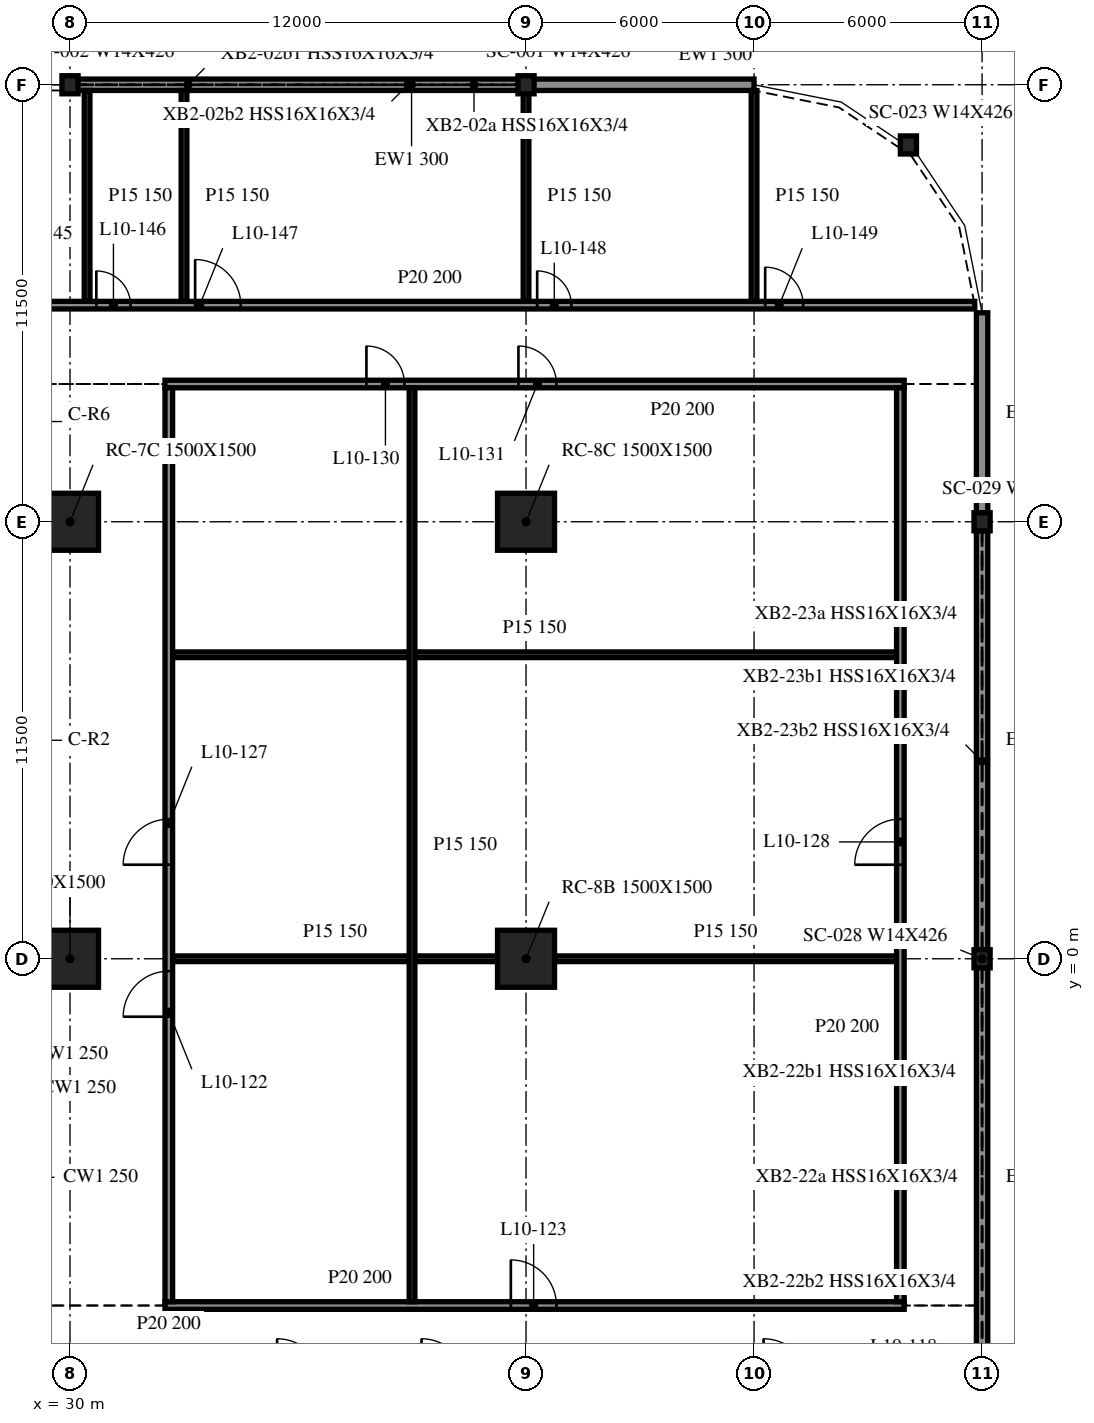
"""IFC4 building model, lengths in metres.
Left out: names, types, materials, properties, quantities, classifications, styles, units other than length and angle.
Written with IfcOpenShell. Run it as: python <this file> out.ifc"""

import sys

from ifc_helpers import new_model, si_unit, direction, frame, frame_2d, origin, origin_2d, place, context, subcontext, project, spatial, rectangle, i_section, extrude, element, fill, save


model = new_model("IFC4")
c1 = context("Model", 3, precision=1e-05, world=origin(), true_north=direction((0.0, 1.0)))
c2 = subcontext(c1, "Body", "Model", "MODEL_VIEW")
j1 = project(units=[si_unit("LENGTHUNIT", "METRE"), si_unit("PLANEANGLEUNIT", "RADIAN")], contexts=[c1])
p1 = place(None, origin())
s1 = spatial("IfcSite", under=j1, at=p1, CompositionType="ELEMENT")
p2 = place(p1, origin())
s2 = spatial("IfcBuilding", under=s1, at=p2, CompositionType="ELEMENT")
p3 = place(p2, frame((0.0, 0.0, 46.0)))
s3 = spatial("IfcBuildingStorey", under=s2, at=p3, CompositionType="ELEMENT", Elevation=46.0)
for number, where, z_axis, x_axis in (
    (1, (30.0, 0.0, -0.34), (0.0, 0.0, 1.0), (1.0, 0.0, 0.0)),
    (2, (30.0, 11.5, -0.34), (0.0, 0.0, 1.0), (1.0, 0.0, 0.0)),
    (3, (42.0, 0.0, -0.34), (0.0, 0.0, 1.0), (1.0, 0.0, 0.0)),
    (4, (42.0, 11.5, -0.34), (0.0, 0.0, 1.0), (1.0, 0.0, 0.0)),
):
    element("IfcColumn", number, at=place(p3, frame(where, z_axis=z_axis, x_axis=x_axis)), inside=s3, PredefinedType="COLUMN", context=c2, shape_type="SweptSolid", body=[
        extrude(rectangle(XDim=1.5, YDim=1.5, at=origin_2d()), origin(), (0.0, 0.0, 1.0), 4.3),
    ])
for number, where, z_axis, x_axis in (
    (5, (52.062, 21.416, -0.34), (0.0, 0.0, 1.0), (1.0, 0.0, 0.0)),
    (6, (42.0, 23.0, -0.34), (0.0, 0.0, 1.0), (1.0, 0.0, 0.0)),
    (7, (30.0, 23.0, -0.34), (0.0, 0.0, 1.0), (1.0, 0.0, 0.0)),
    (8, (54.0, 0.0, -0.34), (0.0, 0.0, 1.0), (1.0, 0.0, 0.0)),
    (9, (54.0, 11.5, -0.34), (0.0, 0.0, 1.0), (1.0, 0.0, 0.0)),
):
    element("IfcColumn", number, at=place(p3, frame(where, z_axis=z_axis, x_axis=x_axis)), inside=s3, PredefinedType="COLUMN", context=c2, shape_type="SweptSolid", body=[
        extrude(i_section(OverallWidth=0.424, OverallDepth=0.475, WebThickness=0.048, FlangeThickness=0.077, at=origin_2d()), origin(), (0.0, 0.0, 1.0), 4.3),
    ])
p4 = place(p3, frame((48.0, 23.0, 0.0), z_axis=(0.0, 0.0, 1.0), x_axis=(-1.0, 0.0, 0.0)))
e10 = element("IfcWall", 10, at=p4, inside=s3, PredefinedType="NOTDEFINED", context=c2, shape_type="SweptSolid", body=[
    extrude(rectangle(XDim=5.976, YDim=0.3, at=frame_2d((2.988, 0.0))), origin(), (0.0, 0.0, 1.0), 3.203),
])
p5 = place(p3, frame((41.976, 23.0, 0.0), z_axis=(0.0, 0.0, 1.0), x_axis=(-1.0, 0.0, 0.0)))
e11 = element("IfcWall", 11, at=p5, inside=s3, PredefinedType="NOTDEFINED", context=c2, shape_type="SweptSolid", body=[
    extrude(rectangle(XDim=11.952, YDim=0.3, at=frame_2d((5.976, 0.0))), origin(), (0.0, 0.0, 1.0), 3.203),
])
for number, where, z_axis, x_axis in (
    (12, (54.0, -11.262, 0.0), (0.0, 0.0, 1.0), (0.0, 1.0, 0.0)),
    (13, (54.0, 0.238, 0.0), (0.0, 0.0, 1.0), (0.0, 1.0, 0.0)),
):
    element("IfcWall", number, at=place(p3, frame(where, z_axis=z_axis, x_axis=x_axis)), inside=s3, PredefinedType="NOTDEFINED", context=c2, shape_type="SweptSolid", body=[
        extrude(rectangle(XDim=11.024, YDim=0.3, at=frame_2d((5.512, 0.0))), origin(), (0.0, 0.0, 1.0), 3.203),
    ])
p6 = place(p3, frame((54.0, 11.738, 0.0), z_axis=(0.0, 0.0, 1.0), x_axis=(0.0, 1.0, 0.0)))
e14 = element("IfcWall", 14, at=p6, inside=s3, PredefinedType="NOTDEFINED", context=c2, shape_type="SweptSolid", body=[
    extrude(rectangle(XDim=5.262, YDim=0.3, at=frame_2d((2.631, 0.0))), origin(), (0.0, 0.0, 1.0), 3.203),
])
p7 = place(p3, frame((32.5, -9.125, 0.0), z_axis=(0.0, 0.0, 1.0), x_axis=(1.0, 0.0, 0.0)))
e15 = element("IfcWall", 15, at=p7, inside=s3, PredefinedType="PARTITIONING", context=c2, shape_type="SweptSolid", body=[
    extrude(rectangle(XDim=19.45, YDim=0.2, at=frame_2d((9.725, 0.0))), origin(), (0.0, 0.0, 1.0), 3.96),
])
p8 = place(p7, frame((9.1, 0.0, 0.0)))
e16 = element("IfcOpeningElement", 16, at=p8, cuts=e15, PredefinedType="OPENING", context=c2, shape_type="SweptSolid", body=[
    extrude(rectangle(XDim=1.2, YDim=2.1, at=frame_2d((0.6, 1.05))), frame((0.0, 0.11, 0.0), z_axis=(0.0, -1.0, 0.0), x_axis=(1.0, 0.0, 0.0)), (0.0, 0.0, 1.0), 0.22),
])
p9 = place(p3, frame((32.7, 0.0, 0.0), z_axis=(0.0, 0.0, 1.0), x_axis=(1.0, 0.0, 0.0)))
e17 = element("IfcWall", 17, at=p9, inside=s3, PredefinedType="PARTITIONING", context=c2, shape_type="SweptSolid", body=[
    extrude(rectangle(XDim=8.55, YDim=0.15, at=frame_2d((4.275, 0.0))), origin(), (0.0, 0.0, 1.0), 3.96),
])
p10 = place(p3, frame((42.75, 0.0, 0.0), z_axis=(0.0, 0.0, 1.0), x_axis=(1.0, 0.0, 0.0)))
e18 = element("IfcWall", 18, at=p10, inside=s3, PredefinedType="PARTITIONING", context=c2, shape_type="SweptSolid", body=[
    extrude(rectangle(XDim=9.0, YDim=0.15, at=frame_2d((4.5, 0.0))), origin(), (0.0, 0.0, 1.0), 3.96),
])
p11 = place(p3, frame((32.7, 8.0, 0.0), z_axis=(0.0, 0.0, 1.0), x_axis=(1.0, 0.0, 0.0)))
e19 = element("IfcWall", 19, at=p11, inside=s3, PredefinedType="PARTITIONING", context=c2, shape_type="SweptSolid", body=[
    extrude(rectangle(XDim=19.05, YDim=0.15, at=frame_2d((9.525, 0.0))), origin(), (0.0, 0.0, 1.0), 3.96),
])
p12 = place(p3, frame((32.5, 15.125, 0.0), z_axis=(0.0, 0.0, 1.0), x_axis=(1.0, 0.0, 0.0)))
e20 = element("IfcWall", 20, at=p12, inside=s3, PredefinedType="PARTITIONING", context=c2, shape_type="SweptSolid", body=[
    extrude(rectangle(XDim=19.45, YDim=0.2, at=frame_2d((9.725, 0.0))), origin(), (0.0, 0.0, 1.0), 3.96),
])
p13 = place(p12, frame((5.3, 0.0, 0.0)))
e21 = element("IfcOpeningElement", 21, at=p13, cuts=e20, PredefinedType="OPENING", context=c2, shape_type="SweptSolid", body=[
    extrude(rectangle(XDim=1.0, YDim=2.1, at=frame_2d((0.5, 1.05))), frame((0.0, 0.11, 0.0), z_axis=(0.0, -1.0, 0.0), x_axis=(1.0, 0.0, 0.0)), (0.0, 0.0, 1.0), 0.22),
])
p14 = place(p12, frame((9.3, 0.0, 0.0)))
e22 = element("IfcOpeningElement", 22, at=p14, cuts=e20, PredefinedType="OPENING", context=c2, shape_type="SweptSolid", body=[
    extrude(rectangle(XDim=1.0, YDim=2.1, at=frame_2d((0.5, 1.05))), frame((0.0, 0.11, 0.0), z_axis=(0.0, -1.0, 0.0), x_axis=(1.0, 0.0, 0.0)), (0.0, 0.0, 1.0), 0.22),
])
p15 = place(p3, frame((-41.807, 17.2, 0.0), z_axis=(0.0, 0.0, 1.0), x_axis=(1.0, 0.0, 0.0)))
e23 = element("IfcWall", 23, at=p15, inside=s3, PredefinedType="PARTITIONING", context=c2, shape_type="SweptSolid", body=[
    extrude(rectangle(XDim=95.615, YDim=0.2, at=frame_2d((47.807, 0.0))), origin(), (0.0, 0.0, 1.0), 3.96),
])
p16 = place(p15, frame((7.5, 0.0, 0.0)))
e24 = element("IfcOpeningElement", 24, at=p16, cuts=e23, PredefinedType="OPENING", context=c2, shape_type="SweptSolid", body=[
    extrude(rectangle(XDim=1.0, YDim=2.1, at=frame_2d((0.5, 1.05))), frame((0.0, 0.11, 0.0), z_axis=(0.0, -1.0, 0.0), x_axis=(1.0, 0.0, 0.0)), (0.0, 0.0, 1.0), 0.22),
])
p17 = place(p15, frame((10.9, 0.0, 0.0)))
e25 = element("IfcOpeningElement", 25, at=p17, cuts=e23, PredefinedType="OPENING", context=c2, shape_type="SweptSolid", body=[
    extrude(rectangle(XDim=1.0, YDim=2.1, at=frame_2d((0.5, 1.05))), frame((0.0, 0.11, 0.0), z_axis=(0.0, -1.0, 0.0), x_axis=(1.0, 0.0, 0.0)), (0.0, 0.0, 1.0), 0.22),
])
p18 = place(p15, frame((13.7, 0.0, 0.0)))
e26 = element("IfcOpeningElement", 26, at=p18, cuts=e23, PredefinedType="OPENING", context=c2, shape_type="SweptSolid", body=[
    extrude(rectangle(XDim=0.9, YDim=2.1, at=frame_2d((0.45, 1.05))), frame((0.0, 0.11, 0.0), z_axis=(0.0, -1.0, 0.0), x_axis=(1.0, 0.0, 0.0)), (0.0, 0.0, 1.0), 0.22),
])
p19 = place(p15, frame((22.3, 0.0, 0.0)))
e27 = element("IfcOpeningElement", 27, at=p19, cuts=e23, PredefinedType="OPENING", context=c2, shape_type="SweptSolid", body=[
    extrude(rectangle(XDim=1.2, YDim=2.1, at=frame_2d((0.6, 1.05))), frame((0.0, 0.11, 0.0), z_axis=(0.0, -1.0, 0.0), x_axis=(1.0, 0.0, 0.0)), (0.0, 0.0, 1.0), 0.22),
])
p20 = place(p15, frame((28.7, 0.0, 0.0)))
e28 = element("IfcOpeningElement", 28, at=p20, cuts=e23, PredefinedType="OPENING", context=c2, shape_type="SweptSolid", body=[
    extrude(rectangle(XDim=0.9, YDim=2.1, at=frame_2d((0.45, 1.05))), frame((0.0, 0.11, 0.0), z_axis=(0.0, -1.0, 0.0), x_axis=(1.0, 0.0, 0.0)), (0.0, 0.0, 1.0), 0.22),
])
p21 = place(p15, frame((37.5, 0.0, 0.0)))
e29 = element("IfcOpeningElement", 29, at=p21, cuts=e23, PredefinedType="OPENING", context=c2, shape_type="SweptSolid", body=[
    extrude(rectangle(XDim=1.0, YDim=2.1, at=frame_2d((0.5, 1.05))), frame((0.0, 0.11, 0.0), z_axis=(0.0, -1.0, 0.0), x_axis=(1.0, 0.0, 0.0)), (0.0, 0.0, 1.0), 0.22),
])
p22 = place(p15, frame((40.9, 0.0, 0.0)))
e30 = element("IfcOpeningElement", 30, at=p22, cuts=e23, PredefinedType="OPENING", context=c2, shape_type="SweptSolid", body=[
    extrude(rectangle(XDim=1.0, YDim=2.1, at=frame_2d((0.5, 1.05))), frame((0.0, 0.11, 0.0), z_axis=(0.0, -1.0, 0.0), x_axis=(1.0, 0.0, 0.0)), (0.0, 0.0, 1.0), 0.22),
])
p23 = place(p15, frame((43.7, 0.0, 0.0)))
e31 = element("IfcOpeningElement", 31, at=p23, cuts=e23, PredefinedType="OPENING", context=c2, shape_type="SweptSolid", body=[
    extrude(rectangle(XDim=0.9, YDim=2.1, at=frame_2d((0.45, 1.05))), frame((0.0, 0.11, 0.0), z_axis=(0.0, -1.0, 0.0), x_axis=(1.0, 0.0, 0.0)), (0.0, 0.0, 1.0), 0.22),
])
p24 = place(p15, frame((47.3, 0.0, 0.0)))
e32 = element("IfcOpeningElement", 32, at=p24, cuts=e23, PredefinedType="OPENING", context=c2, shape_type="SweptSolid", body=[
    extrude(rectangle(XDim=1.2, YDim=2.1, at=frame_2d((0.6, 1.05))), frame((0.0, 0.11, 0.0), z_axis=(0.0, -1.0, 0.0), x_axis=(1.0, 0.0, 0.0)), (0.0, 0.0, 1.0), 0.22),
])
p25 = place(p15, frame((54.1, 0.0, 0.0)))
e33 = element("IfcOpeningElement", 33, at=p25, cuts=e23, PredefinedType="OPENING", context=c2, shape_type="SweptSolid", body=[
    extrude(rectangle(XDim=0.9, YDim=2.1, at=frame_2d((0.45, 1.05))), frame((0.0, 0.11, 0.0), z_axis=(0.0, -1.0, 0.0), x_axis=(1.0, 0.0, 0.0)), (0.0, 0.0, 1.0), 0.22),
])
p26 = place(p15, frame((60.1, 0.0, 0.0)))
e34 = element("IfcOpeningElement", 34, at=p26, cuts=e23, PredefinedType="OPENING", context=c2, shape_type="SweptSolid", body=[
    extrude(rectangle(XDim=1.0, YDim=2.1, at=frame_2d((0.5, 1.05))), frame((0.0, 0.11, 0.0), z_axis=(0.0, -1.0, 0.0), x_axis=(1.0, 0.0, 0.0)), (0.0, 0.0, 1.0), 0.22),
])
p27 = place(p15, frame((69.1, 0.0, 0.0)))
e35 = element("IfcOpeningElement", 35, at=p27, cuts=e23, PredefinedType="OPENING", context=c2, shape_type="SweptSolid", body=[
    extrude(rectangle(XDim=1.0, YDim=2.1, at=frame_2d((0.5, 1.05))), frame((0.0, 0.11, 0.0), z_axis=(0.0, -1.0, 0.0), x_axis=(1.0, 0.0, 0.0)), (0.0, 0.0, 1.0), 0.22),
])
p28 = place(p15, frame((72.5, 0.0, 0.0)))
e36 = element("IfcOpeningElement", 36, at=p28, cuts=e23, PredefinedType="OPENING", context=c2, shape_type="SweptSolid", body=[
    extrude(rectangle(XDim=0.9, YDim=2.1, at=frame_2d((0.45, 1.05))), frame((0.0, 0.11, 0.0), z_axis=(0.0, -1.0, 0.0), x_axis=(1.0, 0.0, 0.0)), (0.0, 0.0, 1.0), 0.22),
])
p29 = place(p15, frame((75.1, 0.0, 0.0)))
e37 = element("IfcOpeningElement", 37, at=p29, cuts=e23, PredefinedType="OPENING", context=c2, shape_type="SweptSolid", body=[
    extrude(rectangle(XDim=1.2, YDim=2.1, at=frame_2d((0.6, 1.05))), frame((0.0, 0.11, 0.0), z_axis=(0.0, -1.0, 0.0), x_axis=(1.0, 0.0, 0.0)), (0.0, 0.0, 1.0), 0.22),
])
p30 = place(p15, frame((84.1, 0.0, 0.0)))
e38 = element("IfcOpeningElement", 38, at=p30, cuts=e23, PredefinedType="OPENING", context=c2, shape_type="SweptSolid", body=[
    extrude(rectangle(XDim=0.9, YDim=2.1, at=frame_2d((0.45, 1.05))), frame((0.0, 0.11, 0.0), z_axis=(0.0, -1.0, 0.0), x_axis=(1.0, 0.0, 0.0)), (0.0, 0.0, 1.0), 0.22),
])
p31 = place(p15, frame((90.1, 0.0, 0.0)))
e39 = element("IfcOpeningElement", 39, at=p31, cuts=e23, PredefinedType="OPENING", context=c2, shape_type="SweptSolid", body=[
    extrude(rectangle(XDim=1.0, YDim=2.1, at=frame_2d((0.5, 1.05))), frame((0.0, 0.11, 0.0), z_axis=(0.0, -1.0, 0.0), x_axis=(1.0, 0.0, 0.0)), (0.0, 0.0, 1.0), 0.22),
])
p32 = place(p3, frame((30.45, 17.3, 0.0), z_axis=(0.0, 0.0, 1.0), x_axis=(0.0, 1.0, 0.0)))
e40 = element("IfcWall", 40, at=p32, inside=s3, PredefinedType="PARTITIONING", context=c2, shape_type="SweptSolid", body=[
    extrude(rectangle(XDim=5.55, YDim=0.15, at=frame_2d((2.775, 0.0))), origin(), (0.0, 0.0, 1.0), 3.96),
])
p33 = place(p3, frame((32.6, -9.025, 0.0), z_axis=(0.0, 0.0, 1.0), x_axis=(0.0, 1.0, 0.0)))
e41 = element("IfcWall", 41, at=p33, inside=s3, PredefinedType="PARTITIONING", context=c2, shape_type="SweptSolid", body=[
    extrude(rectangle(XDim=24.05, YDim=0.2, at=frame_2d((12.025, 0.0))), origin(), (0.0, 0.0, 1.0), 3.96),
])
p34 = place(p33, frame((7.5, 0.0, 0.0)))
e42 = element("IfcOpeningElement", 42, at=p34, cuts=e41, PredefinedType="OPENING", context=c2, shape_type="SweptSolid", body=[
    extrude(rectangle(XDim=1.2, YDim=2.1, at=frame_2d((0.6, 1.05))), frame((0.0, 0.11, 0.0), z_axis=(0.0, -1.0, 0.0), x_axis=(1.0, 0.0, 0.0)), (0.0, 0.0, 1.0), 0.22),
])
p35 = place(p33, frame((11.5, 0.0, 0.0)))
e43 = element("IfcOpeningElement", 43, at=p35, cuts=e41, PredefinedType="OPENING", context=c2, shape_type="SweptSolid", body=[
    extrude(rectangle(XDim=1.2, YDim=2.1, at=frame_2d((0.6, 1.05))), frame((0.0, 0.11, 0.0), z_axis=(0.0, -1.0, 0.0), x_axis=(1.0, 0.0, 0.0)), (0.0, 0.0, 1.0), 0.22),
])
p36 = place(p3, frame((33.0, 17.3, 0.0), z_axis=(0.0, 0.0, 1.0), x_axis=(0.0, 1.0, 0.0)))
e44 = element("IfcWall", 44, at=p36, inside=s3, PredefinedType="PARTITIONING", context=c2, shape_type="SweptSolid", body=[
    extrude(rectangle(XDim=5.55, YDim=0.15, at=frame_2d((2.775, 0.0))), origin(), (0.0, 0.0, 1.0), 3.96),
])
p37 = place(p3, frame((39.0, -9.025, 0.0), z_axis=(0.0, 0.0, 1.0), x_axis=(0.0, 1.0, 0.0)))
e45 = element("IfcWall", 45, at=p37, inside=s3, PredefinedType="PARTITIONING", context=c2, shape_type="SweptSolid", body=[
    extrude(rectangle(XDim=24.05, YDim=0.15, at=frame_2d((12.025, 0.0))), origin(), (0.0, 0.0, 1.0), 3.96),
])
p38 = place(p3, frame((42.0, 17.3, 0.0), z_axis=(0.0, 0.0, 1.0), x_axis=(0.0, 1.0, 0.0)))
e46 = element("IfcWall", 46, at=p38, inside=s3, PredefinedType="PARTITIONING", context=c2, shape_type="SweptSolid", body=[
    extrude(rectangle(XDim=5.55, YDim=0.15, at=frame_2d((2.775, 0.0))), origin(), (0.0, 0.0, 1.0), 3.96),
])
p39 = place(p3, frame((48.0, 17.3, 0.0), z_axis=(0.0, 0.0, 1.0), x_axis=(0.0, 1.0, 0.0)))
e47 = element("IfcWall", 47, at=p39, inside=s3, PredefinedType="PARTITIONING", context=c2, shape_type="SweptSolid", body=[
    extrude(rectangle(XDim=5.547, YDim=0.15, at=frame_2d((2.773, 0.0))), origin(), (0.0, 0.0, 1.0), 3.96),
])
p40 = place(p3, frame((51.85, -9.025, 0.0), z_axis=(0.0, 0.0, 1.0), x_axis=(0.0, 1.0, 0.0)))
e48 = element("IfcWall", 48, at=p40, inside=s3, PredefinedType="PARTITIONING", context=c2, shape_type="SweptSolid", body=[
    extrude(rectangle(XDim=24.05, YDim=0.2, at=frame_2d((12.025, 0.0))), origin(), (0.0, 0.0, 1.0), 3.96),
])
p41 = place(p40, frame((11.5, 0.0, 0.0)))
e49 = element("IfcOpeningElement", 49, at=p41, cuts=e48, PredefinedType="OPENING", context=c2, shape_type="SweptSolid", body=[
    extrude(rectangle(XDim=1.2, YDim=2.1, at=frame_2d((0.6, 1.05))), frame((0.0, 0.11, 0.0), z_axis=(0.0, -1.0, 0.0), x_axis=(1.0, 0.0, 0.0)), (0.0, 0.0, 1.0), 0.22),
])
p42 = place(p34, origin())
e50 = element("IfcDoor", 50, at=p42, inside=s3, OperationType="SINGLE_SWING_RIGHT", PredefinedType="DOOR", context=c2, shape_type="SweptSolid", body=[
    extrude(rectangle(XDim=1.2, YDim=2.1, at=frame_2d((0.6, 1.05))), frame((0.0, 0.025, 0.0), z_axis=(0.0, -1.0, 0.0), x_axis=(1.0, 0.0, 0.0)), (0.0, 0.0, 1.0), 0.05),
])
fill(e42, e50)
p43 = place(p8, origin())
e51 = element("IfcDoor", 51, at=p43, inside=s3, OperationType="SINGLE_SWING_LEFT", PredefinedType="DOOR", context=c2, shape_type="SweptSolid", body=[
    extrude(rectangle(XDim=1.2, YDim=2.1, at=frame_2d((0.6, 1.05))), frame((0.0, 0.025, 0.0), z_axis=(0.0, -1.0, 0.0), x_axis=(1.0, 0.0, 0.0)), (0.0, 0.0, 1.0), 0.05),
])
fill(e16, e51)
p44 = place(p35, origin())
e52 = element("IfcDoor", 52, at=p44, inside=s3, OperationType="SINGLE_SWING_LEFT", PredefinedType="DOOR", context=c2, shape_type="SweptSolid", body=[
    extrude(rectangle(XDim=1.2, YDim=2.1, at=frame_2d((0.6, 1.05))), frame((0.0, 0.025, 0.0), z_axis=(0.0, -1.0, 0.0), x_axis=(1.0, 0.0, 0.0)), (0.0, 0.0, 1.0), 0.05),
])
fill(e43, e52)
p45 = place(p41, origin())
e53 = element("IfcDoor", 53, at=p45, inside=s3, OperationType="SINGLE_SWING_RIGHT", PredefinedType="DOOR", context=c2, shape_type="SweptSolid", body=[
    extrude(rectangle(XDim=1.2, YDim=2.1, at=frame_2d((0.6, 1.05))), frame((0.0, 0.025, 0.0), z_axis=(0.0, -1.0, 0.0), x_axis=(1.0, 0.0, 0.0)), (0.0, 0.0, 1.0), 0.05),
])
fill(e49, e53)
p46 = place(p13, origin())
e54 = element("IfcDoor", 54, at=p46, inside=s3, OperationType="SINGLE_SWING_RIGHT", PredefinedType="DOOR", context=c2, shape_type="SweptSolid", body=[
    extrude(rectangle(XDim=1.0, YDim=2.1, at=frame_2d((0.5, 1.05))), frame((0.0, 0.025, 0.0), z_axis=(0.0, -1.0, 0.0), x_axis=(1.0, 0.0, 0.0)), (0.0, 0.0, 1.0), 0.05),
])
fill(e21, e54)
p47 = place(p14, origin())
e55 = element("IfcDoor", 55, at=p47, inside=s3, OperationType="SINGLE_SWING_LEFT", PredefinedType="DOOR", context=c2, shape_type="SweptSolid", body=[
    extrude(rectangle(XDim=1.0, YDim=2.1, at=frame_2d((0.5, 1.05))), frame((0.0, 0.025, 0.0), z_axis=(0.0, -1.0, 0.0), x_axis=(1.0, 0.0, 0.0)), (0.0, 0.0, 1.0), 0.05),
])
fill(e22, e55)
p48 = place(p28, origin())
e56 = element("IfcDoor", 56, at=p48, inside=s3, OperationType="SINGLE_SWING_RIGHT", PredefinedType="DOOR", context=c2, shape_type="SweptSolid", body=[
    extrude(rectangle(XDim=0.9, YDim=2.1, at=frame_2d((0.45, 1.05))), frame((0.0, 0.025, 0.0), z_axis=(0.0, -1.0, 0.0), x_axis=(1.0, 0.0, 0.0)), (0.0, 0.0, 1.0), 0.05),
])
fill(e36, e56)
p49 = place(p29, origin())
e57 = element("IfcDoor", 57, at=p49, inside=s3, OperationType="SINGLE_SWING_RIGHT", PredefinedType="DOOR", context=c2, shape_type="SweptSolid", body=[
    extrude(rectangle(XDim=1.2, YDim=2.1, at=frame_2d((0.6, 1.05))), frame((0.0, 0.025, 0.0), z_axis=(0.0, -1.0, 0.0), x_axis=(1.0, 0.0, 0.0)), (0.0, 0.0, 1.0), 0.05),
])
fill(e37, e57)
p50 = place(p30, origin())
e58 = element("IfcDoor", 58, at=p50, inside=s3, OperationType="SINGLE_SWING_RIGHT", PredefinedType="DOOR", context=c2, shape_type="SweptSolid", body=[
    extrude(rectangle(XDim=0.9, YDim=2.1, at=frame_2d((0.45, 1.05))), frame((0.0, 0.025, 0.0), z_axis=(0.0, -1.0, 0.0), x_axis=(1.0, 0.0, 0.0)), (0.0, 0.0, 1.0), 0.05),
])
fill(e38, e58)
p51 = place(p31, origin())
e59 = element("IfcDoor", 59, at=p51, inside=s3, OperationType="SINGLE_SWING_RIGHT", PredefinedType="DOOR", context=c2, shape_type="SweptSolid", body=[
    extrude(rectangle(XDim=1.0, YDim=2.1, at=frame_2d((0.5, 1.05))), frame((0.0, 0.025, 0.0), z_axis=(0.0, -1.0, 0.0), x_axis=(1.0, 0.0, 0.0)), (0.0, 0.0, 1.0), 0.05),
])
fill(e39, e59)
save(model, sys.argv[1])
